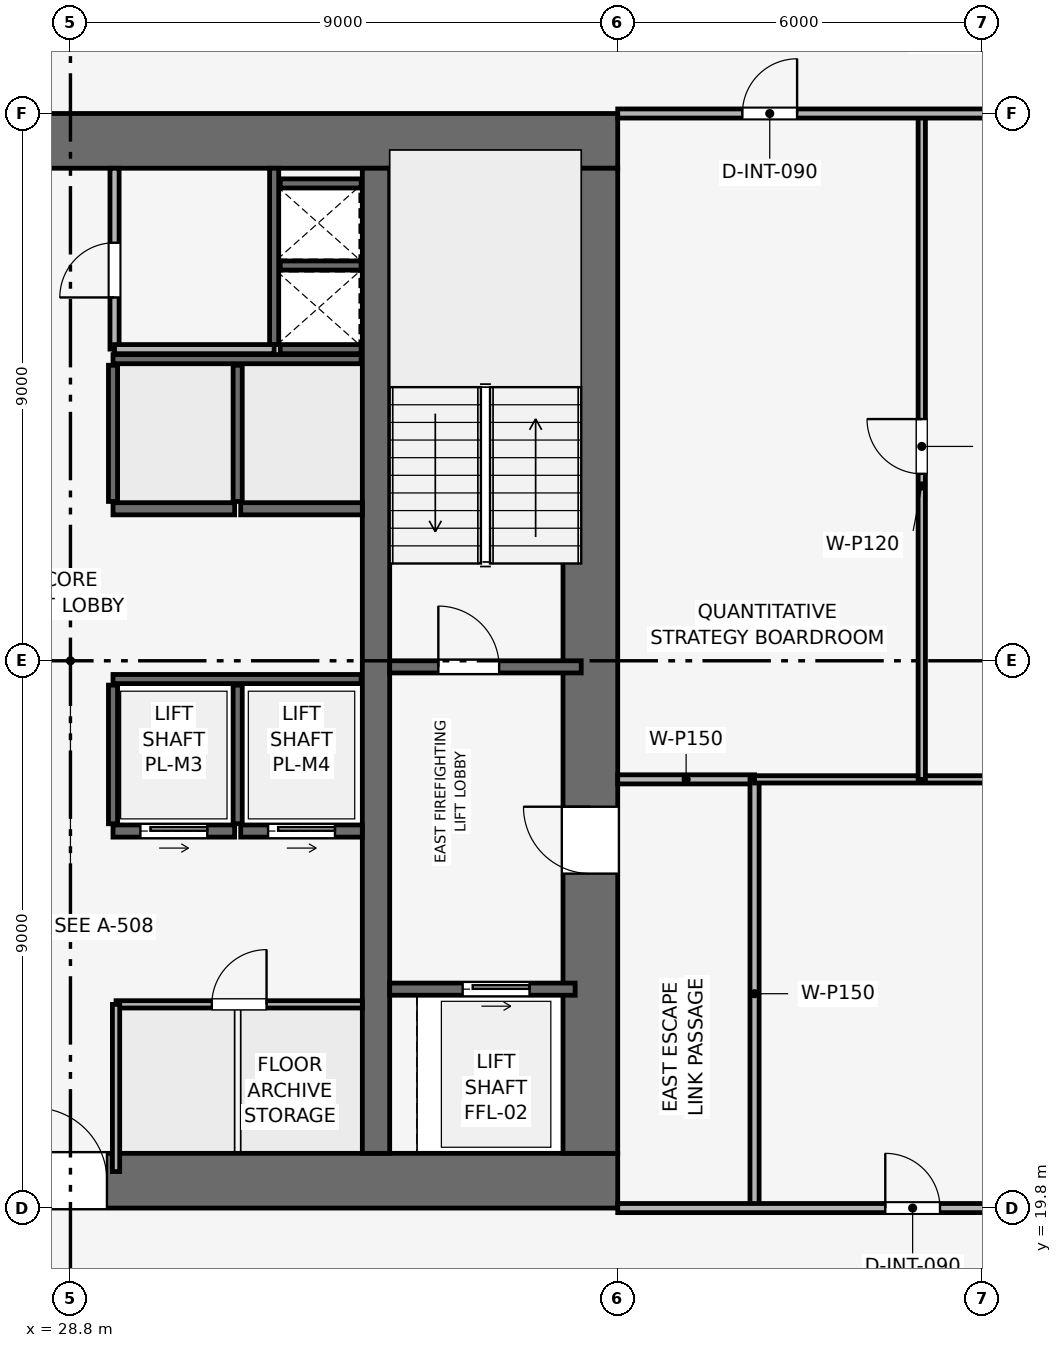
"""IFC4 building model, lengths in metres.
Left out: names, types, materials, properties, quantities, classifications, styles, units other than length and angle.
Written with IfcOpenShell. Run it as: python <this file> out.ifc"""

import sys

from ifc_helpers import new_model, si_unit, direction, frame, frame_2d, origin, place, context, subcontext, project, spatial, rectangle, extrude, element, fill, save


model = new_model("IFC4")
c1 = context("Model", 3, precision=1e-05, world=origin(), true_north=direction((0.0, 1.0)))
c2 = subcontext(c1, "Body", "Model", "MODEL_VIEW")
j1 = project(units=[si_unit("LENGTHUNIT", "METRE"), si_unit("PLANEANGLEUNIT", "RADIAN")], contexts=[c1])
p1 = place(None, origin())
s1 = spatial("IfcSite", under=j1, at=p1, CompositionType="ELEMENT")
p2 = place(p1, origin())
s2 = spatial("IfcBuilding", under=s1, at=p2, CompositionType="ELEMENT")
p3 = place(p2, frame((0.0, 0.0, 190.8)))
s3 = spatial("IfcBuildingStorey", under=s2, at=p3, CompositionType="ELEMENT", Elevation=190.8)
p4 = place(p3, frame((19.8, 20.25, 0.0), z_axis=(0.0, 0.0, 1.0), x_axis=(1.0, 0.0, 0.0)))
e1 = element("IfcWall", 1, at=p4, inside=s3, PredefinedType="SHEAR", context=c2, shape_type="SweptSolid", body=[
    extrude(rectangle(XDim=18.0, YDim=0.9, at=frame_2d((9.0, 0.0))), origin(), (0.0, 0.0, 1.0), 3.75),
])
p5 = place(p4, frame((8.4, 0.0, 0.0)))
e2 = element("IfcOpeningElement", 2, at=p5, cuts=e1, PredefinedType="OPENING", context=c2, shape_type="SweptSolid", body=[
    extrude(rectangle(XDim=1.2, YDim=2.2, at=frame_2d((0.6, 1.1))), frame((0.0, 0.46, 0.0), z_axis=(0.0, -1.0, 0.0), x_axis=(1.0, 0.0, 0.0)), (0.0, 0.0, 1.0), 0.92),
])
p6 = place(p3, frame((19.8, 37.35, 0.0), z_axis=(0.0, 0.0, 1.0), x_axis=(1.0, 0.0, 0.0)))
e3 = element("IfcWall", 3, at=p6, inside=s3, PredefinedType="SHEAR", context=c2, shape_type="SweptSolid", body=[
    extrude(rectangle(XDim=18.0, YDim=0.9, at=frame_2d((9.0, 0.0))), origin(), (0.0, 0.0, 1.0), 3.75),
])
p7 = place(p6, frame((7.05, 0.0, 0.0)))
e4 = element("IfcOpeningElement", 4, at=p7, cuts=e3, PredefinedType="OPENING", context=c2, shape_type="SweptSolid", body=[
    extrude(rectangle(XDim=1.1, YDim=2.15, at=frame_2d((0.55, 1.075))), frame((0.0, 0.46, 0.0), z_axis=(0.0, -1.0, 0.0), x_axis=(1.0, 0.0, 0.0)), (0.0, 0.0, 1.0), 0.92),
])
p8 = place(p3, frame((37.35, 20.7, 0.0), z_axis=(0.0, 0.0, 1.0), x_axis=(0.0, 1.0, 0.0)))
e5 = element("IfcWall", 5, at=p8, inside=s3, PredefinedType="SHEAR", context=c2, shape_type="SweptSolid", body=[
    extrude(rectangle(XDim=16.2, YDim=0.9, at=frame_2d((8.1, 0.0))), origin(), (0.0, 0.0, 1.0), 3.75),
])
p9 = place(p8, frame((4.6, 0.0, 0.0)))
e6 = element("IfcOpeningElement", 6, at=p9, cuts=e5, PredefinedType="OPENING", context=c2, shape_type="SweptSolid", body=[
    extrude(rectangle(XDim=1.1, YDim=2.15, at=frame_2d((0.55, 1.075))), frame((0.0, 0.46, 0.0), z_axis=(0.0, -1.0, 0.0), x_axis=(1.0, 0.0, 0.0)), (0.0, 0.0, 1.0), 0.92),
])
p10 = place(p3, frame((33.825, 20.7, 0.0), z_axis=(0.0, 0.0, 1.0), x_axis=(0.0, 1.0, 0.0)))
e7 = element("IfcWall", 7, at=p10, inside=s3, PredefinedType="SHEAR", context=c2, shape_type="SweptSolid", body=[
    extrude(rectangle(XDim=16.2, YDim=0.45, at=frame_2d((8.1, 0.0))), origin(), (0.0, 0.0, 1.0), 3.75),
])
p11 = place(p3, frame((34.05, 28.7, 0.0), z_axis=(0.0, 0.0, 1.0), x_axis=(1.0, 0.0, 0.0)))
e8 = element("IfcWall", 8, at=p11, inside=s3, PredefinedType="SHEAR", context=c2, shape_type="SweptSolid", body=[
    extrude(rectangle(XDim=3.15, YDim=0.2, at=frame_2d((1.575, 0.0))), origin(), (0.0, 0.0, 1.0), 3.35),
])
p12 = place(p11, frame((0.8, 0.0, 0.0)))
e9 = element("IfcOpeningElement", 9, at=p12, cuts=e8, PredefinedType="OPENING", context=c2, shape_type="SweptSolid", body=[
    extrude(rectangle(XDim=1.0, YDim=2.1, at=frame_2d((0.5, 1.05))), frame((0.0, 0.11, 0.0), z_axis=(0.0, -1.0, 0.0), x_axis=(1.0, 0.0, 0.0)), (0.0, 0.0, 1.0), 0.22),
])
p13 = place(p3, frame((32.15, 34.0, 0.0), z_axis=(0.0, 0.0, 1.0), x_axis=(0.0, 1.0, 0.0)))
e10 = element("IfcWall", 10, at=p13, inside=s3, PredefinedType="SHEAR", context=c2, shape_type="SweptSolid", body=[
    extrude(rectangle(XDim=2.9, YDim=0.15, at=frame_2d((1.45, 0.0))), origin(), (0.0, 0.0, 1.0), 3.35),
])
for number, where, z_axis, x_axis in (
    (11, (32.25, 33.925, 0.0), (0.0, 0.0, 1.0), (1.0, 0.0, 0.0)),
    (12, (32.25, 35.3, 0.0), (0.0, 0.0, 1.0), (1.0, 0.0, 0.0)),
):
    element("IfcWall", number, at=place(p3, frame(where, z_axis=z_axis, x_axis=x_axis)), inside=s3, PredefinedType="SHEAR", context=c2, shape_type="SweptSolid", body=[
        extrude(rectangle(XDim=1.33, YDim=0.15, at=frame_2d((0.665, 0.0))), origin(), (0.0, 0.0, 1.0), 3.35),
    ])
p14 = place(p3, frame((34.05, 23.4, 0.0), z_axis=(0.0, 0.0, 1.0), x_axis=(1.0, 0.0, 0.0)))
e13 = element("IfcWall", 13, at=p14, inside=s3, PredefinedType="SHEAR", context=c2, shape_type="SweptSolid", body=[
    extrude(rectangle(XDim=3.05, YDim=0.2, at=frame_2d((1.525, 0.0))), origin(), (0.0, 0.0, 1.0), 3.35),
])
p15 = place(p14, frame((1.2, 0.0, 0.0)))
e14 = element("IfcOpeningElement", 14, at=p15, cuts=e13, PredefinedType="OPENING", context=c2, shape_type="SweptSolid", body=[
    extrude(rectangle(XDim=1.1, YDim=2.15, at=frame_2d((0.55, 1.075))), frame((0.0, 0.11, 0.0), z_axis=(0.0, -1.0, 0.0), x_axis=(1.0, 0.0, 0.0)), (0.0, 0.0, 1.0), 0.22),
])
p16 = place(p3, frame((29.5, 26.0, 0.0), z_axis=(0.0, 0.0, 1.0), x_axis=(1.0, 0.0, 0.0)))
e15 = element("IfcWall", 15, at=p16, inside=s3, PredefinedType="SHEAR", context=c2, shape_type="SweptSolid", body=[
    extrude(rectangle(XDim=2.0, YDim=0.2, at=frame_2d((1.0, 0.0))), origin(), (0.0, 0.0, 1.0), 3.35),
])
p17 = place(p16, frame((0.45, 0.0, 0.0)))
e16 = element("IfcOpeningElement", 16, at=p17, cuts=e15, PredefinedType="OPENING", context=c2, shape_type="SweptSolid", body=[
    extrude(rectangle(XDim=1.1, YDim=2.15, at=frame_2d((0.55, 1.075))), frame((0.0, 0.11, 0.0), z_axis=(0.0, -1.0, 0.0), x_axis=(1.0, 0.0, 0.0)), (0.0, 0.0, 1.0), 0.22),
])
p18 = place(p3, frame((31.6, 26.0, 0.0), z_axis=(0.0, 0.0, 1.0), x_axis=(1.0, 0.0, 0.0)))
e17 = element("IfcWall", 17, at=p18, inside=s3, PredefinedType="SHEAR", context=c2, shape_type="SweptSolid", body=[
    extrude(rectangle(XDim=2.0, YDim=0.2, at=frame_2d((1.0, 0.0))), origin(), (0.0, 0.0, 1.0), 3.35),
])
p19 = place(p18, frame((0.45, 0.0, 0.0)))
e18 = element("IfcOpeningElement", 18, at=p19, cuts=e17, PredefinedType="OPENING", context=c2, shape_type="SweptSolid", body=[
    extrude(rectangle(XDim=1.1, YDim=2.15, at=frame_2d((0.55, 1.075))), frame((0.0, 0.11, 0.0), z_axis=(0.0, -1.0, 0.0), x_axis=(1.0, 0.0, 0.0)), (0.0, 0.0, 1.0), 0.22),
])
for number, where, z_axis, x_axis in (
    (19, (29.5, 31.3, 0.0), (0.0, 0.0, 1.0), (1.0, 0.0, 0.0)),
    (20, (31.6, 31.3, 0.0), (0.0, 0.0, 1.0), (1.0, 0.0, 0.0)),
):
    element("IfcWall", number, at=place(p3, frame(where, z_axis=z_axis, x_axis=x_axis)), inside=s3, PredefinedType="SHEAR", context=c2, shape_type="SweptSolid", body=[
        extrude(rectangle(XDim=2.0, YDim=0.2, at=frame_2d((1.0, 0.0))), origin(), (0.0, 0.0, 1.0), 3.35),
    ])
p20 = place(p3, frame((32.25, 36.65, 0.0), z_axis=(0.0, 0.0, 1.0), x_axis=(1.0, 0.0, 0.0)))
e21 = element("IfcWall", 21, at=p20, inside=s3, PredefinedType="SHEAR", context=c2, shape_type="SweptSolid", body=[
    extrude(rectangle(XDim=1.33, YDim=0.15, at=frame_2d((0.665, 0.0))), origin(), (0.0, 0.0, 1.0), 3.35),
])
p21 = place(p3, frame((29.5, 28.5, 0.0), z_axis=(0.0, 0.0, 1.0), x_axis=(1.0, 0.0, 0.0)))
e22 = element("IfcWall", 22, at=p21, inside=s3, PredefinedType="SHEAR", context=c2, shape_type="SweptSolid", body=[
    extrude(rectangle(XDim=4.08, YDim=0.15, at=frame_2d((2.04, 0.0))), origin(), (0.0, 0.0, 1.0), 3.35),
])
for number, where, z_axis, x_axis in (
    (23, (29.5, 26.12, 0.0), (0.0, 0.0, 1.0), (0.0, 1.0, 0.0)),
    (24, (31.55, 26.12, 0.0), (0.0, 0.0, 1.0), (0.0, 1.0, 0.0)),
):
    element("IfcWall", number, at=place(p3, frame(where, z_axis=z_axis, x_axis=x_axis)), inside=s3, PredefinedType="SHEAR", context=c2, shape_type="SweptSolid", body=[
        extrude(rectangle(XDim=2.28, YDim=0.15, at=frame_2d((1.14, 0.0))), origin(), (0.0, 0.0, 1.0), 3.35),
    ])
p22 = place(p3, frame((29.5, 33.76, 0.0), z_axis=(0.0, 0.0, 1.0), x_axis=(1.0, 0.0, 0.0)))
e25 = element("IfcWall", 25, at=p22, inside=s3, PredefinedType="SHEAR", context=c2, shape_type="SweptSolid", body=[
    extrude(rectangle(XDim=4.08, YDim=0.15, at=frame_2d((2.04, 0.0))), origin(), (0.0, 0.0, 1.0), 3.35),
])
for number, where, z_axis, x_axis in (
    (26, (29.5, 31.42, 0.0), (0.0, 0.0, 1.0), (0.0, 1.0, 0.0)),
    (27, (31.55, 31.42, 0.0), (0.0, 0.0, 1.0), (0.0, 1.0, 0.0)),
):
    element("IfcWall", number, at=place(p3, frame(where, z_axis=z_axis, x_axis=x_axis)), inside=s3, PredefinedType="SHEAR", context=c2, shape_type="SweptSolid", body=[
        extrude(rectangle(XDim=2.24, YDim=0.15, at=frame_2d((1.12, 0.0))), origin(), (0.0, 0.0, 1.0), 3.35),
    ])
p23 = place(p3, frame((29.525, 33.925, 0.0), z_axis=(0.0, 0.0, 1.0), x_axis=(0.0, 1.0, 0.0)))
e28 = element("IfcWall", 28, at=p23, inside=s3, PredefinedType="PARTITIONING", context=c2, shape_type="SweptSolid", body=[
    extrude(rectangle(XDim=2.975, YDim=0.15, at=frame_2d((1.487, 0.0))), origin(), (0.0, 0.0, 1.0), 3.35),
])
p24 = place(p23, frame((0.85, 0.0, 0.0)))
e29 = element("IfcOpeningElement", 29, at=p24, cuts=e28, PredefinedType="OPENING", context=c2, shape_type="SweptSolid", body=[
    extrude(rectangle(XDim=0.9, YDim=2.1, at=frame_2d((0.45, 1.05))), frame((0.0, 0.085, 0.0), z_axis=(0.0, -1.0, 0.0), x_axis=(1.0, 0.0, 0.0)), (0.0, 0.0, 1.0), 0.17),
])
p25 = place(p3, frame((29.525, 33.925, 0.0), z_axis=(0.0, 0.0, 1.0), x_axis=(1.0, 0.0, 0.0)))
e30 = element("IfcWall", 30, at=p25, inside=s3, PredefinedType="PARTITIONING", context=c2, shape_type="SweptSolid", body=[
    extrude(rectangle(XDim=2.625, YDim=0.15, at=frame_2d((1.312, 0.0))), origin(), (0.0, 0.0, 1.0), 3.35),
])
p26 = place(p3, frame((29.55, 23.15, 0.0), z_axis=(0.0, 0.0, 1.0), x_axis=(1.0, 0.0, 0.0)))
e31 = element("IfcWall", 31, at=p26, inside=s3, PredefinedType="PARTITIONING", context=c2, shape_type="SweptSolid", body=[
    extrude(rectangle(XDim=4.05, YDim=0.12, at=frame_2d((2.025, 0.0))), origin(), (0.0, 0.0, 1.0), 3.35),
])
p27 = place(p26, frame((1.575, 0.0, 0.0)))
e32 = element("IfcOpeningElement", 32, at=p27, cuts=e31, PredefinedType="OPENING", context=c2, shape_type="SweptSolid", body=[
    extrude(rectangle(XDim=0.9, YDim=2.1, at=frame_2d((0.45, 1.05))), frame((0.0, 0.07, 0.0), z_axis=(0.0, -1.0, 0.0), x_axis=(1.0, 0.0, 0.0)), (0.0, 0.0, 1.0), 0.14),
])
p28 = place(p3, frame((29.55, 20.4, 0.0), z_axis=(0.0, 0.0, 1.0), x_axis=(0.0, 1.0, 0.0)))
e33 = element("IfcWall", 33, at=p28, inside=s3, PredefinedType="PARTITIONING", context=c2, shape_type="SweptSolid", body=[
    extrude(rectangle(XDim=2.75, YDim=0.12, at=frame_2d((1.375, 0.0))), origin(), (0.0, 0.0, 1.0), 3.35),
])
p29 = place(p3, frame((37.8, 26.85, 0.0), z_axis=(0.0, 0.0, 1.0), x_axis=(1.0, 0.0, 0.0)))
e34 = element("IfcWall", 34, at=p29, inside=s3, PredefinedType="PARTITIONING", context=c2, shape_type="SweptSolid", body=[
    extrude(rectangle(XDim=2.25, YDim=0.15, at=frame_2d((1.125, 0.0))), origin(), (0.0, 0.0, 1.0), 3.35),
])
p30 = place(p3, frame((40.05, 19.8, 0.0), z_axis=(0.0, 0.0, 1.0), x_axis=(0.0, 1.0, 0.0)))
e35 = element("IfcWall", 35, at=p30, inside=s3, PredefinedType="PARTITIONING", context=c2, shape_type="SweptSolid", body=[
    extrude(rectangle(XDim=7.05, YDim=0.15, at=frame_2d((3.525, 0.0))), origin(), (0.0, 0.0, 1.0), 2.885),
])
p31 = place(p3, frame((40.05, 26.85, 0.0), z_axis=(0.0, 0.0, 1.0), x_axis=(1.0, 0.0, 0.0)))
e36 = element("IfcWall", 36, at=p31, inside=s3, PredefinedType="PARTITIONING", context=c2, shape_type="SweptSolid", body=[
    extrude(rectangle(XDim=12.92, YDim=0.12, at=frame_2d((6.46, 0.0))), origin(), (0.0, 0.0, 1.0), 2.835),
])
p32 = place(p3, frame((42.8, 26.85, 0.0), z_axis=(0.0, 0.0, 1.0), x_axis=(0.0, 1.0, 0.0)))
e37 = element("IfcWall", 37, at=p32, inside=s3, PredefinedType="PARTITIONING", context=c2, shape_type="SweptSolid", body=[
    extrude(rectangle(XDim=10.95, YDim=0.12, at=frame_2d((5.475, 0.0))), origin(), (0.0, 0.0, 1.0), 2.885),
])
p33 = place(p32, frame((5.025, 0.0, 0.0)))
e38 = element("IfcOpeningElement", 38, at=p33, cuts=e37, PredefinedType="OPENING", context=c2, shape_type="SweptSolid", body=[
    extrude(rectangle(XDim=0.9, YDim=2.1, at=frame_2d((0.45, 1.05))), frame((0.0, 0.07, 0.0), z_axis=(0.0, -1.0, 0.0), x_axis=(1.0, 0.0, 0.0)), (0.0, 0.0, 1.0), 0.14),
])
p34 = place(p3, frame((37.8, 19.8, 0.0), z_axis=(0.0, 0.0, 1.0), x_axis=(1.0, 0.0, 0.0)))
e39 = element("IfcWall", 39, at=p34, inside=s3, PredefinedType="PARTITIONING", context=c2, shape_type="SweptSolid", body=[
    extrude(rectangle(XDim=15.17, YDim=0.15, at=frame_2d((7.585, 0.0))), origin(), (0.0, 0.0, 1.0), 2.835),
])
p35 = place(p34, frame((4.4, 0.0, 0.0)))
e40 = element("IfcOpeningElement", 40, at=p35, cuts=e39, PredefinedType="OPENING", context=c2, shape_type="SweptSolid", body=[
    extrude(rectangle(XDim=0.9, YDim=2.1, at=frame_2d((0.45, 1.05))), frame((0.0, 0.085, 0.0), z_axis=(0.0, -1.0, 0.0), x_axis=(1.0, 0.0, 0.0)), (0.0, 0.0, 1.0), 0.17),
])
p36 = place(p3, frame((37.8, 37.8, 0.0), z_axis=(0.0, 0.0, 1.0), x_axis=(1.0, 0.0, 0.0)))
e41 = element("IfcWall", 41, at=p36, inside=s3, PredefinedType="PARTITIONING", context=c2, shape_type="SweptSolid", body=[
    extrude(rectangle(XDim=15.17, YDim=0.15, at=frame_2d((7.585, 0.0))), origin(), (0.0, 0.0, 1.0), 2.835),
])
p37 = place(p36, frame((2.05, 0.0, 0.0)))
e42 = element("IfcOpeningElement", 42, at=p37, cuts=e41, PredefinedType="OPENING", context=c2, shape_type="SweptSolid", body=[
    extrude(rectangle(XDim=0.9, YDim=2.1, at=frame_2d((0.45, 1.05))), frame((0.0, 0.085, 0.0), z_axis=(0.0, -1.0, 0.0), x_axis=(1.0, 0.0, 0.0)), (0.0, 0.0, 1.0), 0.17),
])
p38 = place(p12, origin())
e43 = element("IfcDoor", 43, at=p38, inside=s3, OperationType="SINGLE_SWING_LEFT", PredefinedType="DOOR", context=c2, shape_type="SweptSolid", body=[
    extrude(rectangle(XDim=1.0, YDim=2.1, at=frame_2d((0.5, 1.05))), frame((0.0, 0.025, 0.0), z_axis=(0.0, -1.0, 0.0), x_axis=(1.0, 0.0, 0.0)), (0.0, 0.0, 1.0), 0.05),
])
fill(e9, e43)
p39 = place(p15, origin())
e44 = element("IfcDoor", 44, at=p39, inside=s3, OperationType="SLIDING_TO_RIGHT", PredefinedType="DOOR", context=c2, shape_type="SweptSolid", body=[
    extrude(rectangle(XDim=1.1, YDim=2.15, at=frame_2d((0.55, 1.075))), frame((0.0, 0.025, 0.0), z_axis=(0.0, -1.0, 0.0), x_axis=(1.0, 0.0, 0.0)), (0.0, 0.0, 1.0), 0.05),
])
fill(e14, e44)
p40 = place(p17, origin())
e45 = element("IfcDoor", 45, at=p40, inside=s3, OperationType="SLIDING_TO_RIGHT", PredefinedType="DOOR", context=c2, shape_type="SweptSolid", body=[
    extrude(rectangle(XDim=1.1, YDim=2.15, at=frame_2d((0.55, 1.075))), frame((0.0, 0.025, 0.0), z_axis=(0.0, -1.0, 0.0), x_axis=(1.0, 0.0, 0.0)), (0.0, 0.0, 1.0), 0.05),
])
fill(e16, e45)
p41 = place(p19, origin())
e46 = element("IfcDoor", 46, at=p41, inside=s3, OperationType="SLIDING_TO_RIGHT", PredefinedType="DOOR", context=c2, shape_type="SweptSolid", body=[
    extrude(rectangle(XDim=1.1, YDim=2.15, at=frame_2d((0.55, 1.075))), frame((0.0, 0.025, 0.0), z_axis=(0.0, -1.0, 0.0), x_axis=(1.0, 0.0, 0.0)), (0.0, 0.0, 1.0), 0.05),
])
fill(e18, e46)
p42 = place(p24, origin())
e47 = element("IfcDoor", 47, at=p42, inside=s3, OperationType="SINGLE_SWING_LEFT", PredefinedType="DOOR", context=c2, shape_type="SweptSolid", body=[
    extrude(rectangle(XDim=0.9, YDim=2.1, at=frame_2d((0.45, 1.05))), frame((0.0, 0.025, 0.0), z_axis=(0.0, -1.0, 0.0), x_axis=(1.0, 0.0, 0.0)), (0.0, 0.0, 1.0), 0.05),
])
fill(e29, e47)
p43 = place(p27, origin())
e48 = element("IfcDoor", 48, at=p43, inside=s3, OperationType="SINGLE_SWING_RIGHT", PredefinedType="DOOR", context=c2, shape_type="SweptSolid", body=[
    extrude(rectangle(XDim=0.9, YDim=2.1, at=frame_2d((0.45, 1.05))), frame((0.0, 0.025, 0.0), z_axis=(0.0, -1.0, 0.0), x_axis=(1.0, 0.0, 0.0)), (0.0, 0.0, 1.0), 0.05),
])
fill(e32, e48)
p44 = place(p33, origin())
e49 = element("IfcDoor", 49, at=p44, inside=s3, OperationType="SINGLE_SWING_RIGHT", PredefinedType="DOOR", context=c2, shape_type="SweptSolid", body=[
    extrude(rectangle(XDim=0.9, YDim=2.1, at=frame_2d((0.45, 1.05))), frame((0.0, 0.025, 0.0), z_axis=(0.0, -1.0, 0.0), x_axis=(1.0, 0.0, 0.0)), (0.0, 0.0, 1.0), 0.05),
])
fill(e38, e49)
p45 = place(p35, origin())
e50 = element("IfcDoor", 50, at=p45, inside=s3, OperationType="SINGLE_SWING_LEFT", PredefinedType="DOOR", context=c2, shape_type="SweptSolid", body=[
    extrude(rectangle(XDim=0.9, YDim=2.1, at=frame_2d((0.45, 1.05))), frame((0.0, 0.025, 0.0), z_axis=(0.0, -1.0, 0.0), x_axis=(1.0, 0.0, 0.0)), (0.0, 0.0, 1.0), 0.05),
])
fill(e40, e50)
p46 = place(p37, origin())
e51 = element("IfcDoor", 51, at=p46, inside=s3, OperationType="SINGLE_SWING_RIGHT", PredefinedType="DOOR", context=c2, shape_type="SweptSolid", body=[
    extrude(rectangle(XDim=0.9, YDim=2.1, at=frame_2d((0.45, 1.05))), frame((0.0, 0.025, 0.0), z_axis=(0.0, -1.0, 0.0), x_axis=(1.0, 0.0, 0.0)), (0.0, 0.0, 1.0), 0.05),
])
fill(e42, e51)
p47 = place(p9, origin())
e52 = element("IfcDoor", 52, at=p47, inside=s3, OperationType="SINGLE_SWING_RIGHT", PredefinedType="DOOR", context=c2, shape_type="SweptSolid", body=[
    extrude(rectangle(XDim=1.1, YDim=2.15, at=frame_2d((0.55, 1.075))), frame((0.0, 0.025, 0.0), z_axis=(0.0, -1.0, 0.0), x_axis=(1.0, 0.0, 0.0)), (0.0, 0.0, 1.0), 0.05),
])
fill(e6, e52)
p48 = place(p5, origin())
e53 = element("IfcDoor", 53, at=p48, inside=s3, OperationType="SINGLE_SWING_LEFT", PredefinedType="DOOR", context=c2, shape_type="SweptSolid", body=[
    extrude(rectangle(XDim=1.2, YDim=2.2, at=frame_2d((0.6, 1.1))), frame((0.0, 0.025, 0.0), z_axis=(0.0, -1.0, 0.0), x_axis=(1.0, 0.0, 0.0)), (0.0, 0.0, 1.0), 0.05),
])
fill(e2, e53)
save(model, sys.argv[1])
